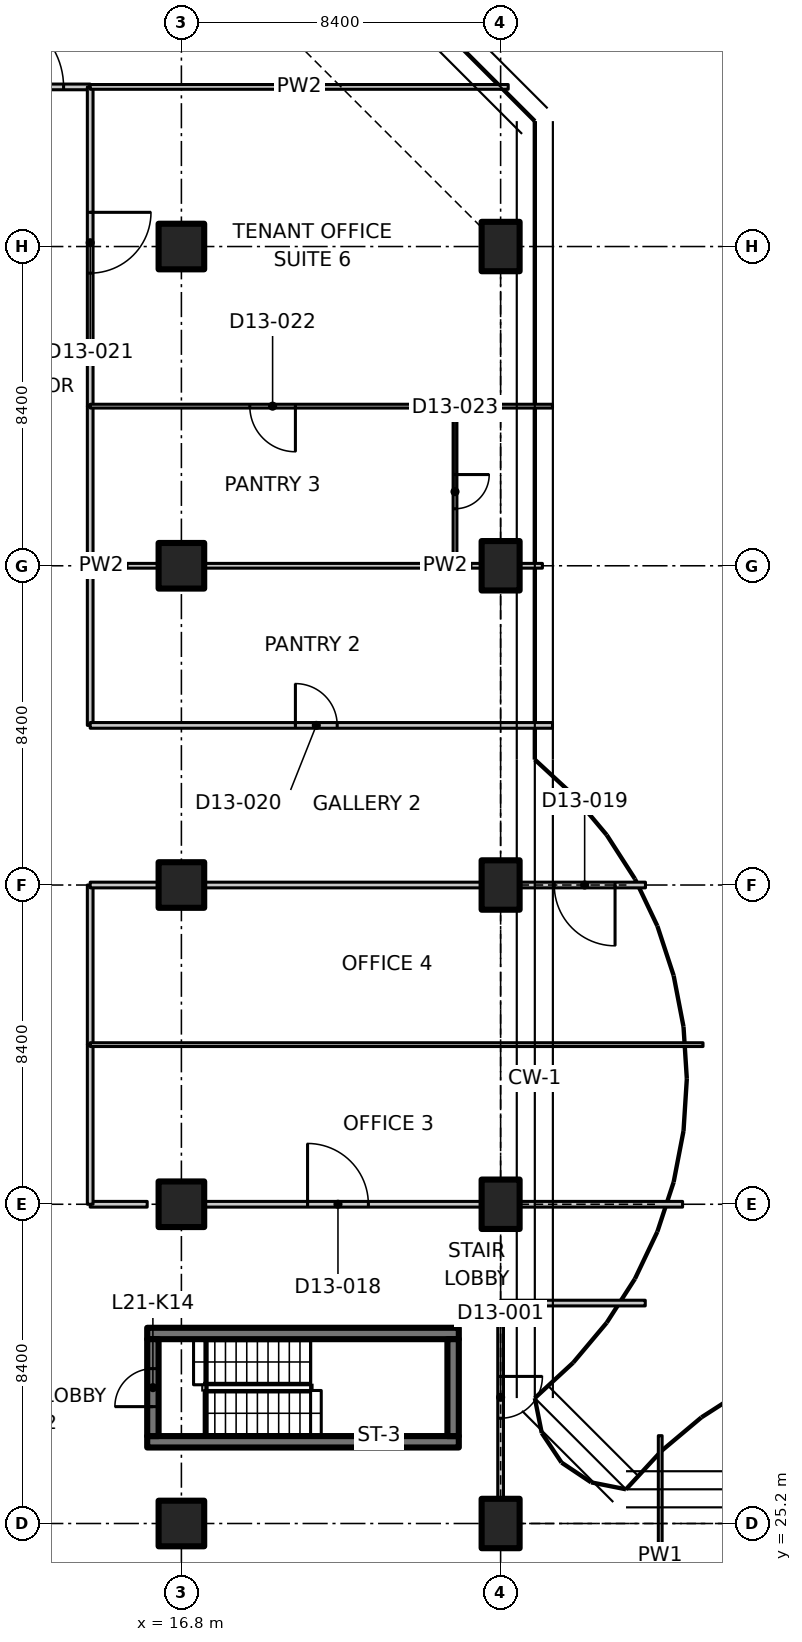
"""IFC4 building model, lengths in metres.
Left out: names, types, materials, properties, quantities, classifications, styles, units other than length and angle.
Written with IfcOpenShell. Run it as: python <this file> out.ifc"""

import sys

from ifc_helpers import new_model, si_unit, direction, frame, frame_2d, origin, origin_2d, place, context, subcontext, project, spatial, polyline, rectangle, outline, extrude, element, fill, save


model = new_model("IFC4")
c1 = context("Model", 3, precision=1e-05, world=origin(), true_north=direction((0.0, 1.0)))
c2 = subcontext(c1, "Body", "Model", "MODEL_VIEW")
j1 = project(units=[si_unit("LENGTHUNIT", "METRE"), si_unit("PLANEANGLEUNIT", "RADIAN")], contexts=[c1])
p1 = place(None, origin())
s1 = spatial("IfcSite", under=j1, at=p1, CompositionType="ELEMENT")
p2 = place(p1, origin())
s2 = spatial("IfcBuilding", under=s1, at=p2, CompositionType="ELEMENT")
p3 = place(p2, frame((0.0, 0.0, 91.7)))
s3 = spatial("IfcBuildingStorey", under=s2, at=p3, CompositionType="ELEMENT", Elevation=91.7)
for number, where, z_axis, x_axis in (
    (1, (16.8, 25.2, 0.0), (0.0, 0.0, 1.0), (1.0, 0.0, 0.0)),
    (2, (16.8, 33.6, 0.0), (0.0, 0.0, 1.0), (1.0, 0.0, 0.0)),
    (3, (16.8, 42.0, 0.0), (0.0, 0.0, 1.0), (1.0, 0.0, 0.0)),
    (4, (16.8, 50.4, 0.0), (0.0, 0.0, 1.0), (1.0, 0.0, 0.0)),
    (5, (16.8, 58.8, 0.0), (0.0, 0.0, 1.0), (1.0, 0.0, 0.0)),
):
    element("IfcColumn", number, at=place(p3, frame(where, z_axis=z_axis, x_axis=x_axis)), inside=s3, PredefinedType="COLUMN", context=c2, shape_type="SweptSolid", body=[
        extrude(rectangle(XDim=1.2, YDim=1.2, at=origin_2d()), origin(), (0.0, 0.0, 1.0), 3.35),
    ])
for number, where, z_axis, x_axis in (
    (6, (25.2, 25.2, 0.0), (0.0, 0.0, 1.0), (1.0, 0.0, 0.0)),
    (7, (25.2, 33.6, 0.0), (0.0, 0.0, 1.0), (1.0, 0.0, 0.0)),
    (8, (25.2, 42.0, 0.0), (0.0, 0.0, 1.0), (1.0, 0.0, 0.0)),
    (9, (25.2, 50.4, 0.0), (0.0, 0.0, 1.0), (1.0, 0.0, 0.0)),
    (10, (25.2, 58.8, 0.0), (0.0, 0.0, 1.0), (1.0, 0.0, 0.0)),
):
    element("IfcColumn", number, at=place(p3, frame(where, z_axis=z_axis, x_axis=x_axis)), inside=s3, PredefinedType="COLUMN", context=c2, shape_type="SweptSolid", body=[
        extrude(rectangle(XDim=1.0, YDim=1.3, at=origin_2d()), origin(), (0.0, 0.0, 1.0), 3.35),
    ])
for number, where, z_axis, x_axis in (
    (11, (15.9, 27.35, 0.0), (0.0, 0.0, 1.0), (1.0, 0.0, 0.0)),
    (12, (15.9, 30.2, 0.0), (0.0, 0.0, 1.0), (1.0, 0.0, 0.0)),
):
    element("IfcWall", number, at=place(p3, frame(where, z_axis=z_axis, x_axis=x_axis)), inside=s3, PredefinedType="SHEAR", context=c2, shape_type="SweptSolid", body=[
        extrude(rectangle(XDim=8.2, YDim=0.3, at=frame_2d((4.1, 0.0))), origin(), (0.0, 0.0, 1.0), 3.35),
    ])
p4 = place(p3, frame((16.05, 27.5, 0.0), z_axis=(0.0, 0.0, 1.0), x_axis=(0.0, 1.0, 0.0)))
e13 = element("IfcWall", 13, at=p4, inside=s3, PredefinedType="SHEAR", context=c2, shape_type="SweptSolid", body=[
    extrude(rectangle(XDim=2.55, YDim=0.3, at=frame_2d((1.275, 0.0))), origin(), (0.0, 0.0, 1.0), 3.35),
])
p5 = place(p4, frame((0.775, 0.0, 0.0)))
e14 = element("IfcOpeningElement", 14, at=p5, cuts=e13, PredefinedType="OPENING", context=c2, shape_type="SweptSolid", body=[
    extrude(rectangle(XDim=1.0, YDim=2.1, at=frame_2d((0.5, 1.05))), frame((0.0, 0.16, 0.0), z_axis=(0.0, -1.0, 0.0), x_axis=(1.0, 0.0, 0.0)), (0.0, 0.0, 1.0), 0.32),
])
p6 = place(p3, frame((23.95, 27.5, 0.0), z_axis=(0.0, 0.0, 1.0), x_axis=(0.0, 1.0, 0.0)))
e15 = element("IfcWall", 15, at=p6, inside=s3, PredefinedType="SHEAR", context=c2, shape_type="SweptSolid", body=[
    extrude(rectangle(XDim=2.55, YDim=0.3, at=frame_2d((1.275, 0.0))), origin(), (0.0, 0.0, 1.0), 3.35),
])
p7 = place(p3, frame((29.4, 27.511, 0.0), z_axis=(0.0, 0.0, 1.0), x_axis=(0.0, -1.0, 0.0)))
e16 = element("IfcWall", 16, at=p7, inside=s3, PredefinedType="PARTITIONING", context=c2, shape_type="SweptSolid", body=[
    extrude(outline(polyline([(0.0, 0.0), (6.311, 0.0), (6.311, 3.33), (2.761, 3.33), (2.759, 2.98), (1.863, 2.98), (1.861, 3.33), (0.236, 3.33), (0.0, 3.33), (0.0, 0.0)])), frame((0.0, 0.05, 0.0), z_axis=(0.0, -1.0, 0.0), x_axis=(1.0, 0.0, 0.0)), (0.0, 0.0, 1.0), 0.1),
])
p8 = place(p3, frame((25.2, 31.0, 0.0), z_axis=(0.0, 0.0, 1.0), x_axis=(0.0, -1.0, 0.0)))
e17 = element("IfcWall", 17, at=p8, inside=s3, PredefinedType="PARTITIONING", context=c2, shape_type="SweptSolid", body=[
    extrude(outline(polyline([(0.0, 0.0), (5.13, 0.0), (5.13, 2.98), (0.0, 2.98), (0.0, 0.0)])), frame((0.0, 0.075, 0.0), z_axis=(0.0, -1.0, 0.0), x_axis=(1.0, 0.0, 0.0)), (0.0, 0.0, 1.0), 0.15),
])
p9 = place(p8, frame((1.93, 0.0, 0.0)))
e18 = element("IfcOpeningElement", 18, at=p9, cuts=e17, PredefinedType="OPENING", context=c2, shape_type="SweptSolid", body=[
    extrude(rectangle(XDim=1.1, YDim=2.1, at=frame_2d((0.55, 1.05))), frame((0.0, 0.085, 0.0), z_axis=(0.0, -1.0, 0.0), x_axis=(1.0, 0.0, 0.0)), (0.0, 0.0, 1.0), 0.17),
])
p10 = place(p3, frame((25.2, 31.0, 0.0), z_axis=(0.0, 0.0, 1.0), x_axis=(1.0, 0.0, 0.0)))
e19 = element("IfcWall", 19, at=p10, inside=s3, PredefinedType="PARTITIONING", context=c2, shape_type="SweptSolid", body=[
    extrude(rectangle(XDim=3.806, YDim=0.15, at=frame_2d((1.903, 0.0))), origin(), (0.0, 0.0, 1.0), 2.98),
])
p11 = place(p3, frame((14.4, 33.6, 0.0), z_axis=(0.0, 0.0, 1.0), x_axis=(1.0, 0.0, 0.0)))
e20 = element("IfcWall", 20, at=p11, inside=s3, PredefinedType="PARTITIONING", context=c2, shape_type="SweptSolid", body=[
    extrude(rectangle(XDim=1.5, YDim=0.15, at=frame_2d((0.75, 0.0))), origin(), (0.0, 0.0, 1.0), 3.33),
])
p12 = place(p3, frame((17.42, 33.6, 0.0), z_axis=(0.0, 0.0, 1.0), x_axis=(1.0, 0.0, 0.0)))
e21 = element("IfcWall", 21, at=p12, inside=s3, PredefinedType="PARTITIONING", context=c2, shape_type="SweptSolid", body=[
    extrude(rectangle(XDim=7.26, YDim=0.15, at=frame_2d((3.63, 0.0))), origin(), (0.0, 0.0, 1.0), 3.33),
])
p13 = place(p12, frame((2.7, 0.0, 0.0)))
e22 = element("IfcOpeningElement", 22, at=p13, cuts=e21, PredefinedType="OPENING", context=c2, shape_type="SweptSolid", body=[
    extrude(rectangle(XDim=1.6, YDim=2.1, at=frame_2d((0.8, 1.05))), frame((0.0, 0.085, 0.0), z_axis=(0.0, -1.0, 0.0), x_axis=(1.0, 0.0, 0.0)), (0.0, 0.0, 1.0), 0.17),
])
p14 = place(p3, frame((25.72, 33.6, 0.0), z_axis=(0.0, 0.0, 1.0), x_axis=(1.0, 0.0, 0.0)))
e23 = element("IfcWall", 23, at=p14, inside=s3, PredefinedType="PARTITIONING", context=c2, shape_type="SweptSolid", body=[
    extrude(rectangle(XDim=4.268, YDim=0.15, at=frame_2d((2.134, 0.0))), origin(), (0.0, 0.0, 1.0), 2.98),
])
p15 = place(p3, frame((10.8, 63.0, 0.0), z_axis=(0.0, 0.0, 1.0), x_axis=(1.0, 0.0, 0.0)))
e24 = element("IfcWall", 24, at=p15, inside=s3, PredefinedType="PARTITIONING", context=c2, shape_type="SweptSolid", body=[
    extrude(rectangle(XDim=3.6, YDim=0.15, at=frame_2d((1.8, 0.0))), origin(), (0.0, 0.0, 1.0), 3.33),
])
p16 = place(p15, frame((0.9, 0.0, 0.0)))
e25 = element("IfcOpeningElement", 25, at=p16, cuts=e24, PredefinedType="OPENING", context=c2, shape_type="SweptSolid", body=[
    extrude(rectangle(XDim=2.0, YDim=2.4, at=frame_2d((1.0, 1.2))), frame((0.0, 0.085, 0.0), z_axis=(0.0, -1.0, 0.0), x_axis=(1.0, 0.0, 0.0)), (0.0, 0.0, 1.0), 0.17),
])
for number, where, z_axis, x_axis in (
    (26, (14.4, 37.8, 0.0), (0.0, 0.0, 1.0), (0.0, -1.0, 0.0)),
    (27, (14.4, 42.0, 0.0), (0.0, 0.0, 1.0), (0.0, -1.0, 0.0)),
    (28, (14.4, 50.4, 0.0), (0.0, 0.0, 1.0), (0.0, -1.0, 0.0)),
):
    element("IfcWall", number, at=place(p3, frame(where, z_axis=z_axis, x_axis=x_axis)), inside=s3, PredefinedType="PARTITIONING", context=c2, shape_type="SweptSolid", body=[
        extrude(rectangle(XDim=4.2, YDim=0.15, at=frame_2d((2.1, 0.0))), origin(), (0.0, 0.0, 1.0), 3.33),
    ])
p17 = place(p3, frame((14.4, 63.0, 0.0), z_axis=(0.0, 0.0, 1.0), x_axis=(0.0, -1.0, 0.0)))
e29 = element("IfcWall", 29, at=p17, inside=s3, PredefinedType="PARTITIONING", context=c2, shape_type="SweptSolid", body=[
    extrude(rectangle(XDim=8.4, YDim=0.15, at=frame_2d((4.2, 0.0))), origin(), (0.0, 0.0, 1.0), 3.33),
])
p18 = place(p17, frame((3.3, 0.0, 0.0)))
e30 = element("IfcOpeningElement", 30, at=p18, cuts=e29, PredefinedType="OPENING", context=c2, shape_type="SweptSolid", body=[
    extrude(rectangle(XDim=1.6, YDim=2.1, at=frame_2d((0.8, 1.05))), frame((0.0, 0.085, 0.0), z_axis=(0.0, -1.0, 0.0), x_axis=(1.0, 0.0, 0.0)), (0.0, 0.0, 1.0), 0.17),
])
p19 = place(p3, frame((14.4, 54.6, 0.0), z_axis=(0.0, 0.0, 1.0), x_axis=(0.0, -1.0, 0.0)))
e31 = element("IfcWall", 31, at=p19, inside=s3, PredefinedType="PARTITIONING", context=c2, shape_type="SweptSolid", body=[
    extrude(rectangle(XDim=4.2, YDim=0.15, at=frame_2d((2.1, 0.0))), origin(), (0.0, 0.0, 1.0), 3.33),
])
p20 = place(p3, frame((25.4, 63.0, 0.0), z_axis=(0.0, 0.0, 1.0), x_axis=(-1.0, 0.0, 0.0)))
e32 = element("IfcWall", 32, at=p20, inside=s3, PredefinedType="PARTITIONING", context=c2, shape_type="SweptSolid", body=[
    extrude(outline(polyline([(0.0, 0.0), (11.0, 0.0), (11.0, 3.33), (5.078, 3.33), (5.076, 2.98), (3.724, 2.98), (3.722, 3.33), (0.0, 3.33), (0.0, 0.0)])), frame((0.0, 0.062, 0.0), z_axis=(0.0, -1.0, 0.0), x_axis=(1.0, 0.0, 0.0)), (0.0, 0.0, 1.0), 0.125),
])
p21 = place(p3, frame((29.011, 42.0, 0.0), z_axis=(0.0, 0.0, 1.0), x_axis=(-1.0, 0.0, 0.0)))
e33 = element("IfcWall", 33, at=p21, inside=s3, PredefinedType="PARTITIONING", context=c2, shape_type="SweptSolid", body=[
    extrude(rectangle(XDim=3.292, YDim=0.15, at=frame_2d((1.646, 0.0))), origin(), (0.0, 0.0, 1.0), 2.98),
])
p22 = place(p21, frame((0.8, 0.0, 0.0)))
e34 = element("IfcOpeningElement", 34, at=p22, cuts=e33, PredefinedType="OPENING", context=c2, shape_type="SweptSolid", body=[
    extrude(rectangle(XDim=1.6, YDim=2.1, at=frame_2d((0.8, 1.05))), frame((0.0, 0.085, 0.0), z_axis=(0.0, -1.0, 0.0), x_axis=(1.0, 0.0, 0.0)), (0.0, 0.0, 1.0), 0.17),
])
p23 = place(p3, frame((24.68, 42.0, 0.0), z_axis=(0.0, 0.0, 1.0), x_axis=(-1.0, 0.0, 0.0)))
e35 = element("IfcWall", 35, at=p23, inside=s3, PredefinedType="PARTITIONING", context=c2, shape_type="SweptSolid", body=[
    extrude(rectangle(XDim=7.26, YDim=0.15, at=frame_2d((3.63, 0.0))), origin(), (0.0, 0.0, 1.0), 3.33),
])
p24 = place(p3, frame((16.18, 42.0, 0.0), z_axis=(0.0, 0.0, 1.0), x_axis=(-1.0, 0.0, 0.0)))
e36 = element("IfcWall", 36, at=p24, inside=s3, PredefinedType="PARTITIONING", context=c2, shape_type="SweptSolid", body=[
    extrude(rectangle(XDim=1.78, YDim=0.15, at=frame_2d((0.89, 0.0))), origin(), (0.0, 0.0, 1.0), 3.33),
])
p25 = place(p3, frame((14.4, 46.2, 0.0), z_axis=(0.0, 0.0, 1.0), x_axis=(1.0, 0.0, 0.0)))
e37 = element("IfcWall", 37, at=p25, inside=s3, PredefinedType="PARTITIONING", context=c2, shape_type="SweptSolid", body=[
    extrude(outline(polyline([(0.0, 0.0), (12.165, 0.0), (12.165, 3.33), (11.9, 3.33), (11.25, 3.33), (11.248, 2.98), (10.352, 2.98), (10.35, 3.33), (0.0, 3.33), (0.0, 0.0)])), frame((0.0, 0.075, 0.0), z_axis=(0.0, -1.0, 0.0), x_axis=(1.0, 0.0, 0.0)), (0.0, 0.0, 1.0), 0.15),
])
p26 = place(p25, frame((5.4, 0.0, 0.0)))
e38 = element("IfcOpeningElement", 38, at=p26, cuts=e37, PredefinedType="OPENING", context=c2, shape_type="SweptSolid", body=[
    extrude(rectangle(XDim=1.1, YDim=2.1, at=frame_2d((0.55, 1.05))), frame((0.0, 0.085, 0.0), z_axis=(0.0, -1.0, 0.0), x_axis=(1.0, 0.0, 0.0)), (0.0, 0.0, 1.0), 0.17),
])
p27 = place(p3, frame((14.4, 37.8, 0.0), z_axis=(0.0, 0.0, 1.0), x_axis=(1.0, 0.0, 0.0)))
e39 = element("IfcWall", 39, at=p27, inside=s3, PredefinedType="PARTITIONING", context=c2, shape_type="SweptSolid", body=[
    extrude(outline(polyline([(0.0, 0.0), (16.126, 0.0), (16.126, 3.33), (15.843, 3.33), (11.25, 3.33), (11.248, 2.98), (10.352, 2.98), (10.35, 3.33), (0.0, 3.33), (0.0, 0.0)])), frame((0.0, 0.05, 0.0), z_axis=(0.0, -1.0, 0.0), x_axis=(1.0, 0.0, 0.0)), (0.0, 0.0, 1.0), 0.1),
])
p28 = place(p3, frame((14.4, 50.4, 0.0), z_axis=(0.0, 0.0, 1.0), x_axis=(1.0, 0.0, 0.0)))
e40 = element("IfcWall", 40, at=p28, inside=s3, PredefinedType="PARTITIONING", context=c2, shape_type="SweptSolid", body=[
    extrude(rectangle(XDim=1.78, YDim=0.125, at=frame_2d((0.89, 0.0))), origin(), (0.0, 0.0, 1.0), 3.33),
])
p29 = place(p3, frame((17.42, 50.4, 0.0), z_axis=(0.0, 0.0, 1.0), x_axis=(1.0, 0.0, 0.0)))
e41 = element("IfcWall", 41, at=p29, inside=s3, PredefinedType="PARTITIONING", context=c2, shape_type="SweptSolid", body=[
    extrude(rectangle(XDim=6.58, YDim=0.125, at=frame_2d((3.29, 0.0))), origin(), (0.0, 0.0, 1.0), 3.33),
])
p30 = place(p3, frame((24.0, 50.4, 0.0), z_axis=(0.0, 0.0, 1.0), x_axis=(1.0, 0.0, 0.0)))
e42 = element("IfcWall", 42, at=p30, inside=s3, PredefinedType="PARTITIONING", context=c2, shape_type="SweptSolid", body=[
    extrude(rectangle(XDim=0.68, YDim=0.125, at=frame_2d((0.34, 0.0))), origin(), (0.0, 0.0, 1.0), 3.33),
])
p31 = place(p3, frame((25.72, 50.4, 0.0), z_axis=(0.0, 0.0, 1.0), x_axis=(1.0, 0.0, 0.0)))
e43 = element("IfcWall", 43, at=p31, inside=s3, PredefinedType="PARTITIONING", context=c2, shape_type="SweptSolid", body=[
    extrude(rectangle(XDim=0.58, YDim=0.125, at=frame_2d((0.29, 0.0))), origin(), (0.0, 0.0, 1.0), 3.33),
])
p32 = place(p3, frame((24.0, 54.6, 0.0), z_axis=(0.0, 0.0, 1.0), x_axis=(-1.0, 0.0, 0.0)))
e44 = element("IfcWall", 44, at=p32, inside=s3, PredefinedType="PARTITIONING", context=c2, shape_type="SweptSolid", body=[
    extrude(rectangle(XDim=9.6, YDim=0.1, at=frame_2d((4.8, 0.0))), origin(), (0.0, 0.0, 1.0), 3.33),
])
p33 = place(p32, frame((4.2, 0.0, 0.0)))
e45 = element("IfcOpeningElement", 45, at=p33, cuts=e44, PredefinedType="OPENING", context=c2, shape_type="SweptSolid", body=[
    extrude(rectangle(XDim=1.2, YDim=2.1, at=frame_2d((0.6, 1.05))), frame((0.0, 0.06, 0.0), z_axis=(0.0, -1.0, 0.0), x_axis=(1.0, 0.0, 0.0)), (0.0, 0.0, 1.0), 0.12),
])
p34 = place(p3, frame((26.565, 54.6, 0.0), z_axis=(0.0, 0.0, 1.0), x_axis=(-1.0, 0.0, 0.0)))
e46 = element("IfcWall", 46, at=p34, inside=s3, PredefinedType="PARTITIONING", context=c2, shape_type="SweptSolid", body=[
    extrude(rectangle(XDim=2.565, YDim=0.1, at=frame_2d((1.282, 0.0))), origin(), (0.0, 0.0, 1.0), 2.98),
])
p35 = place(p3, frame((24.0, 54.6, 0.0), z_axis=(0.0, 0.0, 1.0), x_axis=(0.0, -1.0, 0.0)))
e47 = element("IfcWall", 47, at=p35, inside=s3, PredefinedType="PARTITIONING", context=c2, shape_type="SweptSolid", body=[
    extrude(rectangle(XDim=4.2, YDim=0.1, at=frame_2d((2.1, 0.0))), origin(), (0.0, 0.0, 1.0), 3.33),
])
p36 = place(p35, frame((1.8, 0.0, 0.0)))
e48 = element("IfcOpeningElement", 48, at=p36, cuts=e47, PredefinedType="OPENING", context=c2, shape_type="SweptSolid", body=[
    extrude(rectangle(XDim=0.9, YDim=2.1, at=frame_2d((0.45, 1.05))), frame((0.0, 0.06, 0.0), z_axis=(0.0, -1.0, 0.0), x_axis=(1.0, 0.0, 0.0)), (0.0, 0.0, 1.0), 0.12),
])
p37 = place(p5, origin())
e49 = element("IfcDoor", 49, at=p37, inside=s3, OperationType="SINGLE_SWING_RIGHT", PredefinedType="DOOR", context=c2, shape_type="SweptSolid", body=[
    extrude(rectangle(XDim=1.0, YDim=2.1, at=frame_2d((0.5, 1.05))), frame((0.0, 0.025, 0.0), z_axis=(0.0, -1.0, 0.0), x_axis=(1.0, 0.0, 0.0)), (0.0, 0.0, 1.0), 0.05),
])
fill(e14, e49)
p38 = place(p9, origin())
e50 = element("IfcDoor", 50, at=p38, inside=s3, OperationType="SINGLE_SWING_RIGHT", PredefinedType="DOOR", context=c2, shape_type="SweptSolid", body=[
    extrude(rectangle(XDim=1.1, YDim=2.1, at=frame_2d((0.55, 1.05))), frame((0.0, 0.025, 0.0), z_axis=(0.0, -1.0, 0.0), x_axis=(1.0, 0.0, 0.0)), (0.0, 0.0, 1.0), 0.05),
])
fill(e18, e50)
p39 = place(p16, origin())
e51 = element("IfcDoor", 51, at=p39, inside=s3, OperationType="DOUBLE_DOOR_SINGLE_SWING", PredefinedType="DOOR", context=c2, shape_type="SweptSolid", body=[
    extrude(rectangle(XDim=2.0, YDim=2.4, at=frame_2d((1.0, 1.2))), frame((0.0, 0.025, 0.0), z_axis=(0.0, -1.0, 0.0), x_axis=(1.0, 0.0, 0.0)), (0.0, 0.0, 1.0), 0.05),
])
fill(e25, e51)
p40 = place(p13, origin())
e52 = element("IfcDoor", 52, at=p40, inside=s3, OperationType="DOUBLE_DOOR_SINGLE_SWING", PredefinedType="DOOR", context=c2, shape_type="SweptSolid", body=[
    extrude(rectangle(XDim=1.6, YDim=2.1, at=frame_2d((0.8, 1.05))), frame((0.0, 0.025, 0.0), z_axis=(0.0, -1.0, 0.0), x_axis=(1.0, 0.0, 0.0)), (0.0, 0.0, 1.0), 0.05),
])
fill(e22, e52)
p41 = place(p22, origin())
e53 = element("IfcDoor", 53, at=p41, inside=s3, OperationType="DOUBLE_DOOR_SINGLE_SWING", PredefinedType="DOOR", context=c2, shape_type="SweptSolid", body=[
    extrude(rectangle(XDim=1.6, YDim=2.1, at=frame_2d((0.8, 1.05))), frame((0.0, 0.025, 0.0), z_axis=(0.0, -1.0, 0.0), x_axis=(1.0, 0.0, 0.0)), (0.0, 0.0, 1.0), 0.05),
])
fill(e34, e53)
p42 = place(p26, origin())
e54 = element("IfcDoor", 54, at=p42, inside=s3, OperationType="SINGLE_SWING_LEFT", PredefinedType="DOOR", context=c2, shape_type="SweptSolid", body=[
    extrude(rectangle(XDim=1.1, YDim=2.1, at=frame_2d((0.55, 1.05))), frame((0.0, 0.025, 0.0), z_axis=(0.0, -1.0, 0.0), x_axis=(1.0, 0.0, 0.0)), (0.0, 0.0, 1.0), 0.05),
])
fill(e38, e54)
p43 = place(p18, origin())
e55 = element("IfcDoor", 55, at=p43, inside=s3, OperationType="DOUBLE_DOOR_SINGLE_SWING", PredefinedType="DOOR", context=c2, shape_type="SweptSolid", body=[
    extrude(rectangle(XDim=1.6, YDim=2.1, at=frame_2d((0.8, 1.05))), frame((0.0, 0.025, 0.0), z_axis=(0.0, -1.0, 0.0), x_axis=(1.0, 0.0, 0.0)), (0.0, 0.0, 1.0), 0.05),
])
fill(e30, e55)
p44 = place(p33, origin())
e56 = element("IfcDoor", 56, at=p44, inside=s3, OperationType="SINGLE_SWING_LEFT", PredefinedType="DOOR", context=c2, shape_type="SweptSolid", body=[
    extrude(rectangle(XDim=1.2, YDim=2.1, at=frame_2d((0.6, 1.05))), frame((0.0, 0.025, 0.0), z_axis=(0.0, -1.0, 0.0), x_axis=(1.0, 0.0, 0.0)), (0.0, 0.0, 1.0), 0.05),
])
fill(e45, e56)
p45 = place(p36, origin())
e57 = element("IfcDoor", 57, at=p45, inside=s3, OperationType="SINGLE_SWING_LEFT", PredefinedType="DOOR", context=c2, shape_type="SweptSolid", body=[
    extrude(rectangle(XDim=0.9, YDim=2.1, at=frame_2d((0.45, 1.05))), frame((0.0, 0.025, 0.0), z_axis=(0.0, -1.0, 0.0), x_axis=(1.0, 0.0, 0.0)), (0.0, 0.0, 1.0), 0.05),
])
fill(e48, e57)
save(model, sys.argv[1])
